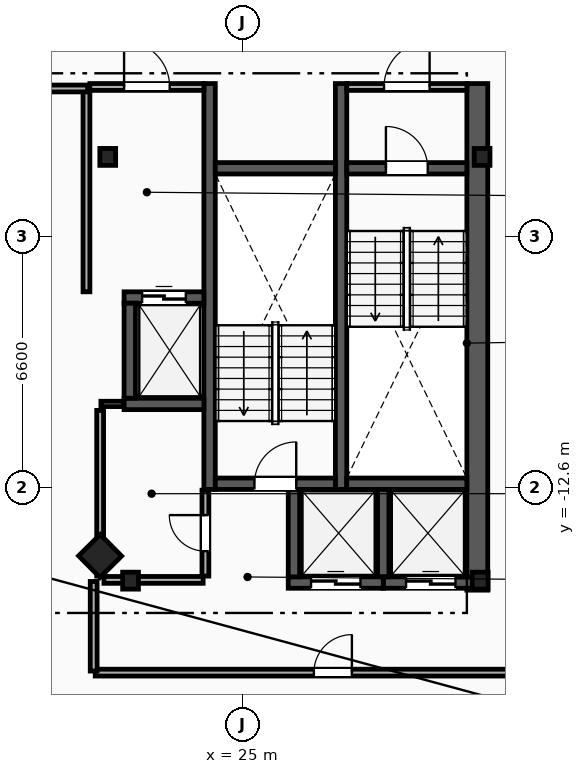
"""IFC4 building model, lengths in metres.
Left out: names, types, materials, properties, quantities, classifications, styles, units other than length and angle.
Written with IfcOpenShell. Run it as: python <this file> out.ifc"""

import sys

from ifc_helpers import new_model, si_unit, direction, frame, frame_2d, origin, origin_2d, place, context, subcontext, project, spatial, rectangle, i_section, extrude, element, fill, save


model = new_model("IFC4")
c1 = context("Model", 3, precision=1e-05, world=origin(), true_north=direction((0.0, 1.0)))
c2 = subcontext(c1, "Body", "Model", "MODEL_VIEW")
j1 = project(units=[si_unit("LENGTHUNIT", "METRE"), si_unit("PLANEANGLEUNIT", "RADIAN")], contexts=[c1])
p1 = place(None, origin())
s1 = spatial("IfcSite", under=j1, at=p1, CompositionType="ELEMENT")
p2 = place(p1, origin())
s2 = spatial("IfcBuilding", under=s1, at=p2, CompositionType="ELEMENT")
p3 = place(p2, frame((0.0, 0.0, 243.2)))
s3 = spatial("IfcBuildingStorey", under=s2, at=p3, CompositionType="ELEMENT", Elevation=243.2)
for number, where, z_axis, x_axis in (
    (1, (31.3, -3.9, 0.0), (0.0, 0.0, 1.0), (1.0, 0.0, 0.0)),
    (2, (21.45, -3.9, 0.0), (0.0, 0.0, 1.0), (1.0, 0.0, 0.0)),
    (3, (22.05, -15.05, 0.0), (0.0, 0.0, 1.0), (1.0, 0.0, 0.0)),
    (4, (31.25, -15.05, 0.0), (0.0, 0.0, 1.0), (1.0, 0.0, 0.0)),
):
    element("IfcColumn", number, at=place(p3, frame(where, z_axis=z_axis, x_axis=x_axis)), inside=s3, PredefinedType="COLUMN", context=c2, shape_type="SweptSolid", body=[
        extrude(i_section(OverallWidth=0.416, OverallDepth=0.446, WebThickness=0.039, FlangeThickness=0.063, FilletRadius=0.018, at=origin_2d()), origin(), (0.0, 0.0, 1.0), 3.6),
    ])
p4 = place(p3, frame((21.25, -14.4, 0.0), z_axis=(0.0, 0.0, 1.0), x_axis=(0.703270634186, -0.710922228581, 0.0)))
e5 = element("IfcColumn", 5, at=p4, inside=s3, PredefinedType="COLUMN", context=c2, shape_type="SweptSolid", body=[
    extrude(rectangle(XDim=0.8, YDim=0.8, at=origin_2d()), origin(), (0.0, 0.0, 1.0), 3.6),
])
p5 = place(p3, frame((31.175, -15.3, 0.0), z_axis=(0.0, 0.0, 1.0), x_axis=(0.0, 1.0, 0.0)))
e6 = element("IfcWall", 6, at=p5, inside=s3, PredefinedType="SHEAR", context=c2, shape_type="SweptSolid", body=[
    extrude(rectangle(XDim=13.33, YDim=0.55, at=frame_2d((6.665, 0.0))), origin(), (0.0, 0.0, 1.0), 3.34),
])
for number, where, z_axis, x_axis in (
    (7, (27.59, -12.65, 0.0), (0.0, 0.0, 1.0), (0.0, 1.0, 0.0)),
    (8, (24.13, -12.65, 0.0), (0.0, 0.0, 1.0), (0.0, 1.0, 0.0)),
):
    element("IfcWall", number, at=place(p3, frame(where, z_axis=z_axis, x_axis=x_axis)), inside=s3, PredefinedType="SHEAR", context=c2, shape_type="SweptSolid", body=[
        extrude(rectangle(XDim=10.68, YDim=0.3, at=frame_2d((5.34, 0.0))), origin(), (0.0, 0.0, 1.0), 3.34),
    ])
p6 = place(p3, frame((27.74, -4.2, 0.0), z_axis=(0.0, 0.0, 1.0), x_axis=(1.0, 0.0, 0.0)))
e9 = element("IfcWall", 9, at=p6, inside=s3, PredefinedType="SHEAR", context=c2, shape_type="SweptSolid", body=[
    extrude(rectangle(XDim=3.16, YDim=0.3, at=frame_2d((1.58, 0.0))), origin(), (0.0, 0.0, 1.0), 3.34),
])
p7 = place(p6, frame((1.03, 0.0, 0.0)))
e10 = element("IfcOpeningElement", 10, at=p7, cuts=e9, PredefinedType="OPENING", context=c2, shape_type="SweptSolid", body=[
    extrude(rectangle(XDim=1.1, YDim=2.15, at=frame_2d((0.55, 1.075))), frame((0.0, 0.16, 0.0), z_axis=(0.0, -1.0, 0.0), x_axis=(1.0, 0.0, 0.0)), (0.0, 0.0, 1.0), 0.32),
])
p8 = place(p3, frame((27.74, -12.5, 0.0), z_axis=(0.0, 0.0, 1.0), x_axis=(1.0, 0.0, 0.0)))
e11 = element("IfcWall", 11, at=p8, inside=s3, PredefinedType="SHEAR", context=c2, shape_type="SweptSolid", body=[
    extrude(rectangle(XDim=3.16, YDim=0.3, at=frame_2d((1.58, 0.0))), origin(), (0.0, 0.0, 1.0), 3.34),
])
p9 = place(p3, frame((24.28, -12.5, 0.0), z_axis=(0.0, 0.0, 1.0), x_axis=(1.0, 0.0, 0.0)))
e12 = element("IfcWall", 12, at=p9, inside=s3, PredefinedType="SHEAR", context=c2, shape_type="SweptSolid", body=[
    extrude(rectangle(XDim=3.16, YDim=0.3, at=frame_2d((1.58, 0.0))), origin(), (0.0, 0.0, 1.0), 3.34),
])
p10 = place(p9, frame((1.03, 0.0, 0.0)))
e13 = element("IfcOpeningElement", 13, at=p10, cuts=e12, PredefinedType="OPENING", context=c2, shape_type="SweptSolid", body=[
    extrude(rectangle(XDim=1.1, YDim=2.15, at=frame_2d((0.55, 1.075))), frame((0.0, 0.16, 0.0), z_axis=(0.0, -1.0, 0.0), x_axis=(1.0, 0.0, 0.0)), (0.0, 0.0, 1.0), 0.32),
])
p11 = place(p3, frame((24.28, -4.2, 0.0), z_axis=(0.0, 0.0, 1.0), x_axis=(1.0, 0.0, 0.0)))
e14 = element("IfcWall", 14, at=p11, inside=s3, PredefinedType="SHEAR", context=c2, shape_type="SweptSolid", body=[
    extrude(rectangle(XDim=3.16, YDim=0.3, at=frame_2d((1.58, 0.0))), origin(), (0.0, 0.0, 1.0), 3.34),
])
p12 = place(p3, frame((20.89, -7.45, 0.0), z_axis=(0.0, 0.0, 1.0), x_axis=(0.0, 1.0, 0.0)))
e15 = element("IfcWall", 15, at=p12, inside=s3, PredefinedType="PARTITIONING", context=c2, shape_type="SweptSolid", body=[
    extrude(rectangle(XDim=5.3, YDim=0.18, at=frame_2d((2.65, 0.0))), origin(), (0.0, 0.0, 1.0), 3.34),
])
p13 = place(p3, frame((20.98, -2.06, 0.0), z_axis=(0.0, 0.0, 1.0), x_axis=(1.0, 0.0, 0.0)))
e16 = element("IfcWall", 16, at=p13, inside=s3, PredefinedType="PARTITIONING", context=c2, shape_type="SweptSolid", body=[
    extrude(rectangle(XDim=3.0, YDim=0.18, at=frame_2d((1.5, 0.0))), origin(), (0.0, 0.0, 1.0), 3.34),
])
p14 = place(p13, frame((0.9, 0.0, 0.0)))
e17 = element("IfcOpeningElement", 17, at=p14, cuts=e16, PredefinedType="OPENING", context=c2, shape_type="SweptSolid", body=[
    extrude(rectangle(XDim=1.2, YDim=2.15, at=frame_2d((0.6, 1.075))), frame((0.0, 0.1, 0.0), z_axis=(0.0, -1.0, 0.0), x_axis=(1.0, 0.0, 0.0)), (0.0, 0.0, 1.0), 0.2),
])
p15 = place(p3, frame((27.74, -2.06, 0.0), z_axis=(0.0, 0.0, 1.0), x_axis=(1.0, 0.0, 0.0)))
e18 = element("IfcWall", 18, at=p15, inside=s3, PredefinedType="PARTITIONING", context=c2, shape_type="SweptSolid", body=[
    extrude(rectangle(XDim=3.16, YDim=0.18, at=frame_2d((1.58, 0.0))), origin(), (0.0, 0.0, 1.0), 3.34),
])
p16 = place(p15, frame((0.98, 0.0, 0.0)))
e19 = element("IfcOpeningElement", 19, at=p16, cuts=e18, PredefinedType="OPENING", context=c2, shape_type="SweptSolid", body=[
    extrude(rectangle(XDim=1.2, YDim=2.15, at=frame_2d((0.6, 1.075))), frame((0.0, 0.1, 0.0), z_axis=(0.0, -1.0, 0.0), x_axis=(1.0, 0.0, 0.0)), (0.0, 0.0, 1.0), 0.2),
])
p17 = place(p3, frame((21.88, -7.6, 0.0), z_axis=(0.0, 0.0, 1.0), x_axis=(1.0, 0.0, 0.0)))
e20 = element("IfcWall", 20, at=p17, inside=s3, PredefinedType="SHEAR", context=c2, shape_type="SweptSolid", body=[
    extrude(rectangle(XDim=2.1, YDim=0.3, at=frame_2d((1.05, 0.0))), origin(), (0.0, 0.0, 1.0), 3.34),
])
p18 = place(p17, frame((0.475, 0.0, 0.0)))
e21 = element("IfcOpeningElement", 21, at=p18, cuts=e20, PredefinedType="OPENING", context=c2, shape_type="SweptSolid", body=[
    extrude(rectangle(XDim=1.15, YDim=2.2, at=frame_2d((0.575, 1.1))), frame((0.0, 0.16, 0.0), z_axis=(0.0, -1.0, 0.0), x_axis=(1.0, 0.0, 0.0)), (0.0, 0.0, 1.0), 0.32),
])
p19 = place(p3, frame((21.88, -10.4, 0.0), z_axis=(0.0, 0.0, 1.0), x_axis=(1.0, 0.0, 0.0)))
e22 = element("IfcWall", 22, at=p19, inside=s3, PredefinedType="SHEAR", context=c2, shape_type="SweptSolid", body=[
    extrude(rectangle(XDim=2.1, YDim=0.3, at=frame_2d((1.05, 0.0))), origin(), (0.0, 0.0, 1.0), 3.34),
])
p20 = place(p3, frame((22.03, -10.25, 0.0), z_axis=(0.0, 0.0, 1.0), x_axis=(0.0, 1.0, 0.0)))
e23 = element("IfcWall", 23, at=p20, inside=s3, PredefinedType="SHEAR", context=c2, shape_type="SweptSolid", body=[
    extrude(rectangle(XDim=2.5, YDim=0.3, at=frame_2d((1.25, 0.0))), origin(), (0.0, 0.0, 1.0), 3.34),
])
p21 = place(p3, frame((28.7, -15.1, 0.0), z_axis=(0.0, 0.0, 1.0), x_axis=(1.0, 0.0, 0.0)))
e24 = element("IfcWall", 24, at=p21, inside=s3, PredefinedType="SHEAR", context=c2, shape_type="SweptSolid", body=[
    extrude(rectangle(XDim=2.5, YDim=0.3, at=frame_2d((1.25, 0.0))), origin(), (0.0, 0.0, 1.0), 3.34),
])
p22 = place(p21, frame((0.6, 0.0, 0.0)))
e25 = element("IfcOpeningElement", 25, at=p22, cuts=e24, PredefinedType="OPENING", context=c2, shape_type="SweptSolid", body=[
    extrude(rectangle(XDim=1.3, YDim=2.2, at=frame_2d((0.65, 1.1))), frame((0.0, 0.16, 0.0), z_axis=(0.0, -1.0, 0.0), x_axis=(1.0, 0.0, 0.0)), (0.0, 0.0, 1.0), 0.32),
])
p23 = place(p3, frame((28.7, -14.95, 0.0), z_axis=(0.0, 0.0, 1.0), x_axis=(0.0, 1.0, 0.0)))
e26 = element("IfcWall", 26, at=p23, inside=s3, PredefinedType="SHEAR", context=c2, shape_type="SweptSolid", body=[
    extrude(rectangle(XDim=2.3, YDim=0.3, at=frame_2d((1.15, 0.0))), origin(), (0.0, 0.0, 1.0), 3.34),
])
p24 = place(p3, frame((26.2, -15.1, 0.0), z_axis=(0.0, 0.0, 1.0), x_axis=(1.0, 0.0, 0.0)))
e27 = element("IfcWall", 27, at=p24, inside=s3, PredefinedType="SHEAR", context=c2, shape_type="SweptSolid", body=[
    extrude(rectangle(XDim=2.5, YDim=0.3, at=frame_2d((1.25, 0.0))), origin(), (0.0, 0.0, 1.0), 3.34),
])
p25 = place(p24, frame((0.6, 0.0, 0.0)))
e28 = element("IfcOpeningElement", 28, at=p25, cuts=e27, PredefinedType="OPENING", context=c2, shape_type="SweptSolid", body=[
    extrude(rectangle(XDim=1.3, YDim=2.2, at=frame_2d((0.65, 1.1))), frame((0.0, 0.16, 0.0), z_axis=(0.0, -1.0, 0.0), x_axis=(1.0, 0.0, 0.0)), (0.0, 0.0, 1.0), 0.32),
])
p26 = place(p3, frame((26.35, -14.95, 0.0), z_axis=(0.0, 0.0, 1.0), x_axis=(0.0, 1.0, 0.0)))
e29 = element("IfcWall", 29, at=p26, inside=s3, PredefinedType="SHEAR", context=c2, shape_type="SweptSolid", body=[
    extrude(rectangle(XDim=2.3, YDim=0.3, at=frame_2d((1.15, 0.0))), origin(), (0.0, 0.0, 1.0), 3.34),
])
p27 = place(p3, frame((21.27, -10.4, 0.0), z_axis=(0.0, 0.0, 1.0), x_axis=(1.0, 0.0, 0.0)))
e30 = element("IfcWall", 30, at=p27, inside=s3, PredefinedType="PARTITIONING", context=c2, shape_type="SweptSolid", body=[
    extrude(rectangle(XDim=0.59, YDim=0.14, at=frame_2d((0.295, 0.0))), origin(), (0.0, 0.0, 1.0), 3.34),
])
p28 = place(p3, frame((21.25, -14.93, 0.0), z_axis=(0.0, 0.0, 1.0), x_axis=(0.0, 1.0, 0.0)))
e31 = element("IfcWall", 31, at=p28, inside=s3, PredefinedType="PARTITIONING", context=c2, shape_type="SweptSolid", body=[
    extrude(rectangle(XDim=4.36, YDim=0.18, at=frame_2d((2.18, 0.0))), origin(), (0.0, 0.0, 1.0), 3.34),
])
p29 = place(p3, frame((21.35, -15.03, 0.0), z_axis=(0.0, 0.0, 1.0), x_axis=(1.0, 0.0, 0.0)))
e32 = element("IfcWall", 32, at=p29, inside=s3, PredefinedType="PARTITIONING", context=c2, shape_type="SweptSolid", body=[
    extrude(rectangle(XDim=2.61, YDim=0.18, at=frame_2d((1.305, 0.0))), origin(), (0.0, 0.0, 1.0), 2.413),
])
p30 = place(p3, frame((24.02, -14.93, 0.0), z_axis=(0.0, 0.0, 1.0), x_axis=(0.0, 1.0, 0.0)))
e33 = element("IfcWall", 33, at=p30, inside=s3, PredefinedType="PARTITIONING", context=c2, shape_type="SweptSolid", body=[
    extrude(rectangle(XDim=2.26, YDim=0.18, at=frame_2d((1.13, 0.0))), origin(), (0.0, 0.0, 1.0), 3.34),
])
p31 = place(p30, frame((0.655, 0.0, 0.0)))
e34 = element("IfcOpeningElement", 34, at=p31, cuts=e33, PredefinedType="OPENING", context=c2, shape_type="SweptSolid", body=[
    extrude(rectangle(XDim=0.95, YDim=2.1, at=frame_2d((0.475, 1.05))), frame((0.0, 0.1, 0.0), z_axis=(0.0, -1.0, 0.0), x_axis=(1.0, 0.0, 0.0)), (0.0, 0.0, 1.0), 0.2),
])
p32 = place(p3, frame((21.122, -17.47, 0.0), z_axis=(0.0, 0.0, 1.0), x_axis=(1.0, 0.0, 0.0)))
e35 = element("IfcWall", 35, at=p32, inside=s3, PredefinedType="PARTITIONING", context=c2, shape_type="SweptSolid", body=[
    extrude(rectangle(XDim=12.507, YDim=0.18, at=frame_2d((6.253, 0.0))), origin(), (0.0, 0.0, 1.0), 3.34),
])
p33 = place(p32, frame((5.753, 0.0, 0.0)))
e36 = element("IfcOpeningElement", 36, at=p33, cuts=e35, PredefinedType="OPENING", context=c2, shape_type="SweptSolid", body=[
    extrude(rectangle(XDim=1.0, YDim=2.15, at=frame_2d((0.5, 1.075))), frame((0.0, 0.1, 0.0), z_axis=(0.0, -1.0, 0.0), x_axis=(1.0, 0.0, 0.0)), (0.0, 0.0, 1.0), 0.2),
])
p34 = place(p3, frame((13.521, -2.1, 0.0), z_axis=(0.0, 0.0, 1.0), x_axis=(1.0, 0.0, 0.0)))
e37 = element("IfcWall", 37, at=p34, inside=s3, PredefinedType="PARTITIONING", context=c2, shape_type="SweptSolid", body=[
    extrude(rectangle(XDim=7.398, YDim=0.18, at=frame_2d((3.699, 0.0))), origin(), (0.0, 0.0, 1.0), 3.34),
])
p35 = place(p3, frame((21.08, -15.072, 0.0), z_axis=(0.0, 0.0, 1.0), x_axis=(0.0, -1.0, 0.0)))
e38 = element("IfcWall", 38, at=p35, inside=s3, PredefinedType="PARTITIONING", context=c2, shape_type="SweptSolid", body=[
    extrude(rectangle(XDim=2.357, YDim=0.18, at=frame_2d((1.178, 0.0))), origin(), (0.0, 0.0, 1.0), 3.34),
])
p36 = place(p7, origin())
e39 = element("IfcDoor", 39, at=p36, inside=s3, OperationType="SINGLE_SWING_LEFT", PredefinedType="DOOR", context=c2, shape_type="SweptSolid", body=[
    extrude(rectangle(XDim=1.1, YDim=2.15, at=frame_2d((0.55, 1.075))), frame((0.0, 0.025, 0.0), z_axis=(0.0, -1.0, 0.0), x_axis=(1.0, 0.0, 0.0)), (0.0, 0.0, 1.0), 0.05),
])
fill(e10, e39)
p37 = place(p10, origin())
e40 = element("IfcDoor", 40, at=p37, inside=s3, OperationType="SINGLE_SWING_RIGHT", PredefinedType="DOOR", context=c2, shape_type="SweptSolid", body=[
    extrude(rectangle(XDim=1.1, YDim=2.15, at=frame_2d((0.55, 1.075))), frame((0.0, 0.025, 0.0), z_axis=(0.0, -1.0, 0.0), x_axis=(1.0, 0.0, 0.0)), (0.0, 0.0, 1.0), 0.05),
])
fill(e13, e40)
p38 = place(p14, origin())
e41 = element("IfcDoor", 41, at=p38, inside=s3, OperationType="SINGLE_SWING_LEFT", PredefinedType="DOOR", context=c2, shape_type="SweptSolid", body=[
    extrude(rectangle(XDim=1.2, YDim=2.15, at=frame_2d((0.6, 1.075))), frame((0.0, 0.025, 0.0), z_axis=(0.0, -1.0, 0.0), x_axis=(1.0, 0.0, 0.0)), (0.0, 0.0, 1.0), 0.05),
])
fill(e17, e41)
p39 = place(p16, origin())
e42 = element("IfcDoor", 42, at=p39, inside=s3, OperationType="SINGLE_SWING_RIGHT", PredefinedType="DOOR", context=c2, shape_type="SweptSolid", body=[
    extrude(rectangle(XDim=1.2, YDim=2.15, at=frame_2d((0.6, 1.075))), frame((0.0, 0.025, 0.0), z_axis=(0.0, -1.0, 0.0), x_axis=(1.0, 0.0, 0.0)), (0.0, 0.0, 1.0), 0.05),
])
fill(e19, e42)
p40 = place(p18, origin())
e43 = element("IfcDoor", 43, at=p40, inside=s3, OperationType="SLIDING_TO_LEFT", PredefinedType="TRAPDOOR", context=c2, shape_type="SweptSolid", body=[
    extrude(rectangle(XDim=1.15, YDim=2.2, at=frame_2d((0.575, 1.1))), frame((0.0, 0.025, 0.0), z_axis=(0.0, -1.0, 0.0), x_axis=(1.0, 0.0, 0.0)), (0.0, 0.0, 1.0), 0.05),
])
fill(e21, e43)
p41 = place(p22, origin())
e44 = element("IfcDoor", 44, at=p41, inside=s3, OperationType="SLIDING_TO_LEFT", PredefinedType="TRAPDOOR", context=c2, shape_type="SweptSolid", body=[
    extrude(rectangle(XDim=1.3, YDim=2.2, at=frame_2d((0.65, 1.1))), frame((0.0, 0.025, 0.0), z_axis=(0.0, -1.0, 0.0), x_axis=(1.0, 0.0, 0.0)), (0.0, 0.0, 1.0), 0.05),
])
fill(e25, e44)
p42 = place(p25, origin())
e45 = element("IfcDoor", 45, at=p42, inside=s3, OperationType="SLIDING_TO_LEFT", PredefinedType="TRAPDOOR", context=c2, shape_type="SweptSolid", body=[
    extrude(rectangle(XDim=1.3, YDim=2.2, at=frame_2d((0.65, 1.1))), frame((0.0, 0.025, 0.0), z_axis=(0.0, -1.0, 0.0), x_axis=(1.0, 0.0, 0.0)), (0.0, 0.0, 1.0), 0.05),
])
fill(e28, e45)
p43 = place(p33, origin())
e46 = element("IfcDoor", 46, at=p43, inside=s3, OperationType="SINGLE_SWING_RIGHT", PredefinedType="DOOR", context=c2, shape_type="SweptSolid", body=[
    extrude(rectangle(XDim=1.0, YDim=2.15, at=frame_2d((0.5, 1.075))), frame((0.0, 0.025, 0.0), z_axis=(0.0, -1.0, 0.0), x_axis=(1.0, 0.0, 0.0)), (0.0, 0.0, 1.0), 0.05),
])
fill(e36, e46)
p44 = place(p31, origin())
e47 = element("IfcDoor", 47, at=p44, inside=s3, OperationType="SINGLE_SWING_RIGHT", PredefinedType="DOOR", context=c2, shape_type="SweptSolid", body=[
    extrude(rectangle(XDim=0.95, YDim=2.1, at=frame_2d((0.475, 1.05))), frame((0.0, 0.025, 0.0), z_axis=(0.0, -1.0, 0.0), x_axis=(1.0, 0.0, 0.0)), (0.0, 0.0, 1.0), 0.05),
])
fill(e34, e47)
save(model, sys.argv[1])
